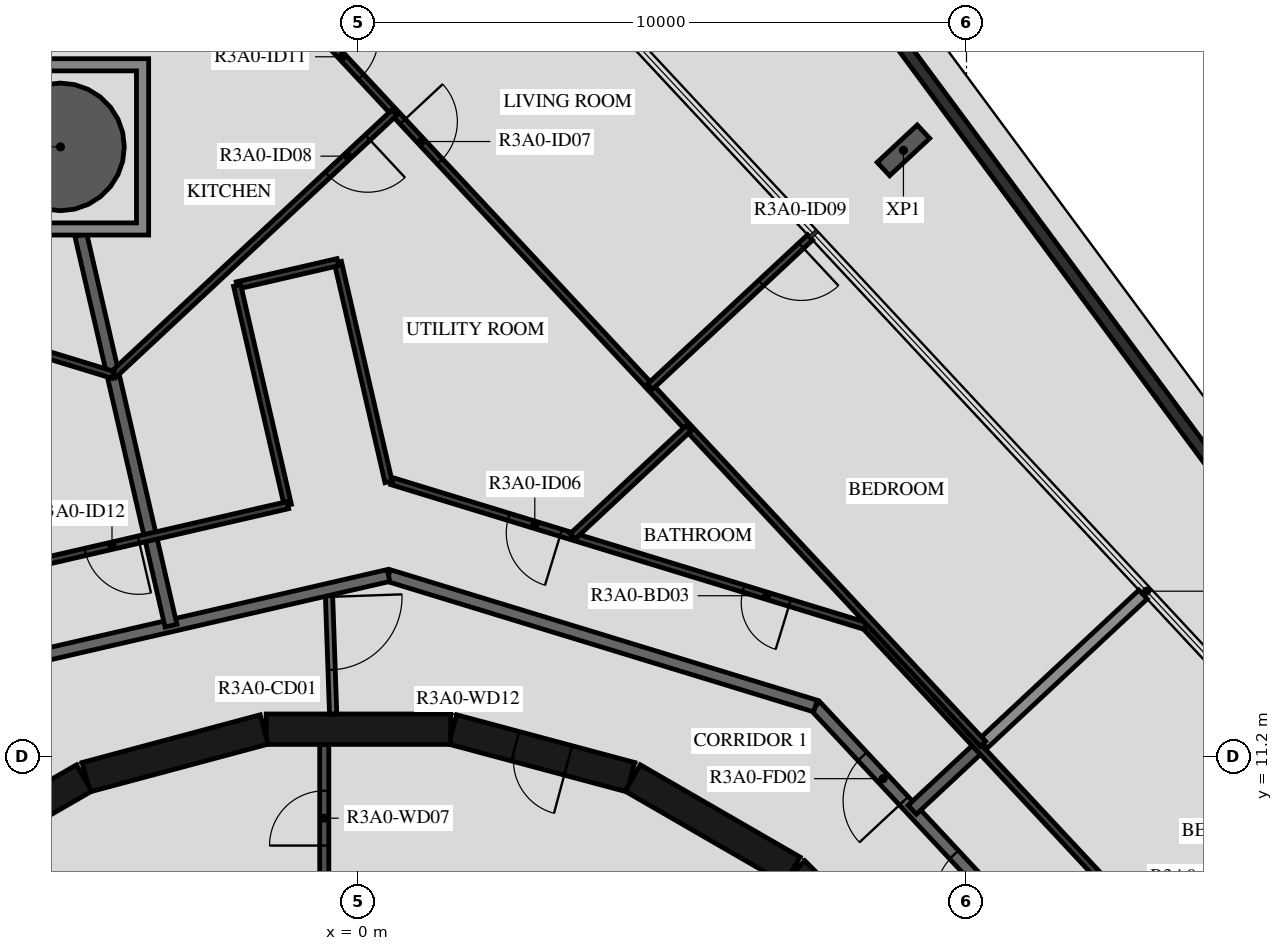
"""IFC4 building model, lengths in metres.
Left out: names, types, materials, properties, quantities, classifications, styles, units other than length and angle.
Written with IfcOpenShell. Run it as: python <this file> out.ifc"""

import sys

from ifc_helpers import new_model, si_unit, direction, frame, frame_2d, origin, origin_2d, place, context, subcontext, project, spatial, polyline, rectangle, hollow_circle, i_section, outline, extrude, element, fill, save


model = new_model("IFC4")
c1 = context("Model", 3, precision=1e-05, world=origin(), true_north=direction((0.0, 1.0)))
c2 = subcontext(c1, "Body", "Model", "MODEL_VIEW")
j1 = project(units=[si_unit("LENGTHUNIT", "METRE"), si_unit("PLANEANGLEUNIT", "RADIAN")], contexts=[c1])
p1 = place(None, origin())
s1 = spatial("IfcSite", under=j1, at=p1, CompositionType="ELEMENT")
p2 = place(p1, origin())
s2 = spatial("IfcBuilding", under=s1, at=p2, CompositionType="ELEMENT")
p3 = place(p2, frame((0.0, 0.0, 113.4)))
s3 = spatial("IfcBuildingStorey", under=s2, at=p3, CompositionType="ELEMENT", Elevation=113.4)
p4 = place(p3, frame((-4.9, 21.223, -0.45), z_axis=(0.0, 0.0, 1.0), x_axis=(1.0, 0.0, 0.0)))
e1 = element("IfcColumn", 1, at=p4, inside=s3, PredefinedType="COLUMN", context=c2, shape_type="SweptSolid", body=[
    extrude(hollow_circle(Radius=1.05, WallThickness=0.05, at=origin_2d()), origin(), (0.0, 0.0, 1.0), 3.57),
])
p5 = place(p3, frame((8.963, 21.167, -0.45), z_axis=(0.0, 0.0, 1.0), x_axis=(0.68199801865, -0.731354019992, 0.0)))
e2 = element("IfcColumn", 2, at=p5, inside=s3, PredefinedType="COLUMN", context=c2, shape_type="SweptSolid", body=[
    extrude(i_section(OverallWidth=0.3, OverallDepth=0.9, WebThickness=0.019, FlangeThickness=0.035, FilletRadius=0.03, at=origin_2d()), origin(), (0.0, 0.0, 1.0), 3.57),
])
p6 = place(p3, frame((5.146, 28.027, 0.03), z_axis=(0.0, 0.0, 1.0), x_axis=(0.595048436217, -0.803689839774, 0.0)))
e3 = element("IfcWall", 3, at=p6, inside=s3, PredefinedType="PARAPET", context=c2, shape_type="SweptSolid", body=[
    extrude(rectangle(XDim=35.306, YDim=0.2, at=frame_2d((17.653, 0.0))), origin(), (0.0, 0.0, 1.0), 1.5),
])
p7 = place(p3, frame((9.308, 7.164, 0.0), z_axis=(0.0, 0.0, 1.0), x_axis=(-0.707106781187, 0.707106781187, 0.0)))
e4 = element("IfcWall", 4, at=p7, inside=s3, PredefinedType="SHEAR", context=c2, shape_type="SweptSolid", body=[
    extrude(rectangle(XDim=3.032, YDim=0.5, at=frame_2d((1.516, 0.0))), origin(), (0.0, 0.0, 1.0), 3.12),
])
p8 = place(p7, frame((0.416, 0.0, 0.0)))
e5 = element("IfcOpeningElement", 5, at=p8, cuts=e4, PredefinedType="OPENING", context=c2, shape_type="SweptSolid", body=[
    extrude(rectangle(XDim=1.2, YDim=2.1, at=frame_2d((0.6, 1.05))), frame((0.0, 0.26, 0.0), z_axis=(0.0, -1.0, 0.0), x_axis=(1.0, 0.0, 0.0)), (0.0, 0.0, 1.0), 0.52),
])
p9 = place(p3, frame((7.137, 9.329, 0.0), z_axis=(0.0, 0.0, 1.0), x_axis=(-0.865975092491, 0.500087131594, 0.0)))
e6 = element("IfcWall", 6, at=p9, inside=s3, PredefinedType="SHEAR", context=c2, shape_type="SweptSolid", body=[
    extrude(rectangle(XDim=3.033, YDim=0.5, at=frame_2d((1.516, 0.0))), origin(), (0.0, 0.0, 1.0), 3.12),
])
p10 = place(p3, frame((4.479, 10.858, 0.0), z_axis=(0.0, 0.0, 1.0), x_axis=(-0.965948410781, 0.258734743916, 0.0)))
e7 = element("IfcWall", 7, at=p10, inside=s3, PredefinedType="SHEAR", context=c2, shape_type="SweptSolid", body=[
    extrude(rectangle(XDim=3.033, YDim=0.5, at=frame_2d((1.516, 0.0))), origin(), (0.0, 0.0, 1.0), 3.12),
])
p11 = place(p10, frame((1.066, 0.0, 0.0)))
e8 = element("IfcOpeningElement", 8, at=p11, cuts=e7, PredefinedType="OPENING", context=c2, shape_type="SweptSolid", body=[
    extrude(rectangle(XDim=0.9, YDim=2.1, at=frame_2d((0.45, 1.05))), frame((0.0, 0.26, 0.0), z_axis=(0.0, -1.0, 0.0), x_axis=(1.0, 0.0, 0.0)), (0.0, 0.0, 1.0), 0.52),
])
for number, where, z_axis, x_axis in (
    (9, (1.516, 11.647, 0.0), (0.0, 0.0, 1.0), (-1.0, 0.0, 0.0)),
    (10, (-1.55, 11.643, 0.0), (0.0, 0.0, 1.0), (-0.966, -0.259, 0.0)),
    (11, (-4.51, 10.845, 0.0), (0.0, 0.0, 1.0), (-0.866, -0.5, 0.0)),
):
    element("IfcWall", number, at=place(p3, frame(where, z_axis=z_axis, x_axis=x_axis)), inside=s3, PredefinedType="SHEAR", context=c2, shape_type="SweptSolid", body=[
        extrude(rectangle(XDim=3.033, YDim=0.5, at=frame_2d((1.516, 0.0))), origin(), (0.0, 0.0, 1.0), 3.12),
    ])
p12 = place(p3, frame((-0.562, 8.97, 0.0), z_axis=(0.0, 0.0, 1.0), x_axis=(0.0, 1.0, 0.0)))
e12 = element("IfcWall", 12, at=p12, inside=s3, PredefinedType="PARTITIONING", context=c2, shape_type="SweptSolid", body=[
    extrude(rectangle(XDim=2.427, YDim=0.15, at=frame_2d((1.214, 0.0))), origin(), (0.0, 0.0, 1.0), 3.12),
])
p13 = place(p12, frame((0.764, 0.0, 0.0)))
e13 = element("IfcOpeningElement", 13, at=p13, cuts=e12, PredefinedType="OPENING", context=c2, shape_type="SweptSolid", body=[
    extrude(rectangle(XDim=0.9, YDim=2.1, at=frame_2d((0.45, 1.05))), frame((0.0, 0.085, 0.0), z_axis=(0.0, -1.0, 0.0), x_axis=(1.0, 0.0, 0.0)), (0.0, 0.0, 1.0), 0.17),
])
p14 = place(p3, frame((-0.487, 13.948, 0.0), z_axis=(0.0, 0.0, 1.0), x_axis=(0.034859752231, -0.999392214135, 0.0)))
e14 = element("IfcWall", 14, at=p14, inside=s3, PredefinedType="PARTITIONING", context=c2, shape_type="SweptSolid", body=[
    extrude(rectangle(XDim=2.052, YDim=0.12, at=frame_2d((1.026, 0.0))), origin(), (0.0, 0.0, 1.0), 3.12),
])
p15 = place(p14, frame((0.125, 0.0, 0.0)))
e15 = element("IfcOpeningElement", 15, at=p15, cuts=e14, PredefinedType="OPENING", context=c2, shape_type="SweptSolid", body=[
    extrude(rectangle(XDim=1.2, YDim=2.1, at=frame_2d((0.6, 1.05))), frame((0.0, 0.07, 0.0), z_axis=(0.0, -1.0, 0.0), x_axis=(1.0, 0.0, 0.0)), (0.0, 0.0, 1.0), 0.14),
])
p16 = place(p3, frame((12.523, 6.659, 0.0), z_axis=(0.0, 0.0, 1.0), x_axis=(-0.682001841105, 0.731350455479, 0.0)))
e16 = element("IfcWall", 16, at=p16, inside=s3, PredefinedType="STANDARD", context=c2, shape_type="SweptSolid", body=[
    extrude(rectangle(XDim=7.342, YDim=0.2, at=frame_2d((3.671, 0.0))), origin(), (0.0, 0.0, 1.0), 3.12),
])
p17 = place(p16, frame((3.0, 0.0, 0.0)))
e17 = element("IfcOpeningElement", 17, at=p17, cuts=e16, PredefinedType="OPENING", context=c2, shape_type="SweptSolid", body=[
    extrude(rectangle(XDim=1.0, YDim=2.1, at=frame_2d((0.5, 1.05))), frame((0.0, 0.11, 0.0), z_axis=(0.0, -1.0, 0.0), x_axis=(1.0, 0.0, 0.0)), (0.0, 0.0, 1.0), 0.22),
])
p18 = place(p16, frame((5.209, 0.0, 0.0)))
e18 = element("IfcOpeningElement", 18, at=p18, cuts=e16, PredefinedType="OPENING", context=c2, shape_type="SweptSolid", body=[
    extrude(rectangle(XDim=1.0, YDim=2.1, at=frame_2d((0.5, 1.05))), frame((0.0, 0.11, 0.0), z_axis=(0.0, -1.0, 0.0), x_axis=(1.0, 0.0, 0.0)), (0.0, 0.0, 1.0), 0.22),
])
p19 = place(p3, frame((7.516, 12.028, 0.0), z_axis=(0.0, 0.0, 1.0), x_axis=(-0.956306642771, 0.292365533182, 0.0)))
e19 = element("IfcWall", 19, at=p19, inside=s3, PredefinedType="STANDARD", context=c2, shape_type="SweptSolid", body=[
    extrude(rectangle(XDim=7.342, YDim=0.2, at=frame_2d((3.671, 0.0))), origin(), (0.0, 0.0, 1.0), 3.12),
])
p20 = place(p3, frame((0.495, 14.175, 0.0), z_axis=(0.0, 0.0, 1.0), x_axis=(-0.974376622151, -0.224922649383, 0.0)))
e20 = element("IfcWall", 20, at=p20, inside=s3, PredefinedType="STANDARD", context=c2, shape_type="SweptSolid", body=[
    extrude(rectangle(XDim=7.342, YDim=0.2, at=frame_2d((3.671, 0.0))), origin(), (0.0, 0.0, 1.0), 3.12),
])
p21 = place(p3, frame((10.233, 11.372, 0.0), z_axis=(0.0, 0.0, 1.0), x_axis=(-0.731329353292, -0.682024469513, 0.0)))
e21 = element("IfcWall", 21, at=p21, inside=s3, PredefinedType="STANDARD", context=c2, shape_type="SweptSolid", body=[
    extrude(rectangle(XDim=1.54, YDim=0.2, at=frame_2d((0.77, 0.0))), origin(), (0.0, 0.0, 1.0), 3.12),
])
p22 = place(p3, frame((12.903, 13.862, 0.0), z_axis=(0.0, 0.0, 1.0), x_axis=(-0.731328084739, -0.682025829769, 0.0)))
e22 = element("IfcWall", 22, at=p22, inside=s3, PredefinedType="STANDARD", context=c2, shape_type="SweptSolid", body=[
    extrude(rectangle(XDim=3.6, YDim=0.2, at=frame_2d((1.8, 0.0))), origin(), (0.0, 0.0, 1.0), 2.73),
])
p23 = place(p3, frame((-4.565, 19.773, 0.0), z_axis=(0.0, 0.0, 1.0), x_axis=(0.224940633072, -0.974372470667, 0.0)))
e23 = element("IfcWall", 23, at=p23, inside=s3, PredefinedType="STANDARD", context=c2, shape_type="SweptSolid", body=[
    extrude(rectangle(XDim=6.594, YDim=0.2, at=frame_2d((3.297, 0.0))), origin(), (0.0, 0.0, 1.0), 3.12),
])
p24 = place(p3, frame((13.894, 7.388, 0.0), z_axis=(0.0, 0.0, 1.0), x_axis=(-0.681994622729, 0.731357186721, 0.0)))
e24 = element("IfcWall", 24, at=p24, inside=s3, PredefinedType="PARTITIONING", context=c2, shape_type="SweptSolid", body=[
    extrude(rectangle(XDim=8.146, YDim=0.12, at=frame_2d((4.073, 0.0))), origin(), (0.0, 0.0, 1.0), 3.12),
])
p25 = place(p24, frame((0.2, 0.0, 0.0)))
e25 = element("IfcOpeningElement", 25, at=p25, cuts=e24, PredefinedType="OPENING", context=c2, shape_type="SweptSolid", body=[
    extrude(rectangle(XDim=0.9, YDim=2.1, at=frame_2d((0.45, 1.05))), frame((0.0, 0.07, 0.0), z_axis=(0.0, -1.0, 0.0), x_axis=(1.0, 0.0, 0.0)), (0.0, 0.0, 1.0), 0.14),
])
p26 = place(p3, frame((8.339, 13.345, 0.0), z_axis=(0.0, 0.0, 1.0), x_axis=(-0.956310145342, 0.292354076276, 0.0)))
e26 = element("IfcWall", 26, at=p26, inside=s3, PredefinedType="PARTITIONING", context=c2, shape_type="SweptSolid", body=[
    extrude(rectangle(XDim=8.146, YDim=0.12, at=frame_2d((4.073, 0.0))), origin(), (0.0, 0.0, 1.0), 3.12),
])
p27 = place(p26, frame((1.3, 0.0, 0.0)))
e27 = element("IfcOpeningElement", 27, at=p27, cuts=e26, PredefinedType="OPENING", context=c2, shape_type="SweptSolid", body=[
    extrude(rectangle(XDim=0.8, YDim=2.1, at=frame_2d((0.4, 1.05))), frame((0.0, 0.07, 0.0), z_axis=(0.0, -1.0, 0.0), x_axis=(1.0, 0.0, 0.0)), (0.0, 0.0, 1.0), 0.14),
])
p28 = place(p26, frame((5.237, 0.0, 0.0)))
e28 = element("IfcOpeningElement", 28, at=p28, cuts=e26, PredefinedType="OPENING", context=c2, shape_type="SweptSolid", body=[
    extrude(rectangle(XDim=0.9, YDim=2.1, at=frame_2d((0.45, 1.05))), frame((0.0, 0.07, 0.0), z_axis=(0.0, -1.0, 0.0), x_axis=(1.0, 0.0, 0.0)), (0.0, 0.0, 1.0), 0.14),
])
p29 = place(p3, frame((0.496, 15.714, 0.0), z_axis=(0.0, 0.0, 1.0), x_axis=(-0.224960478174, 0.974367889075, 0.0)))
e29 = element("IfcWall", 29, at=p29, inside=s3, PredefinedType="PARTITIONING", context=c2, shape_type="SweptSolid", body=[
    extrude(rectangle(XDim=3.708, YDim=0.12, at=frame_2d((1.854, 0.0))), origin(), (0.0, 0.0, 1.0), 3.12),
])
p30 = place(p3, frame((-0.338, 19.328, 0.0), z_axis=(0.0, 0.0, 1.0), x_axis=(-0.974383934081, -0.224890971374, 0.0)))
e30 = element("IfcWall", 30, at=p30, inside=s3, PredefinedType="PARTITIONING", context=c2, shape_type="SweptSolid", body=[
    extrude(rectangle(XDim=1.7, YDim=0.12, at=frame_2d((0.85, 0.0))), origin(), (0.0, 0.0, 1.0), 3.12),
])
p31 = place(p3, frame((-1.995, 18.945, 0.0), z_axis=(0.0, 0.0, 1.0), x_axis=(0.224946048274, -0.974371220514, 0.0)))
e31 = element("IfcWall", 31, at=p31, inside=s3, PredefinedType="PARTITIONING", context=c2, shape_type="SweptSolid", body=[
    extrude(rectangle(XDim=3.708, YDim=0.12, at=frame_2d((1.854, 0.0))), origin(), (0.0, 0.0, 1.0), 3.12),
])
p32 = place(p3, frame((-1.161, 15.332, 0.0), z_axis=(0.0, 0.0, 1.0), x_axis=(-0.974373440078, -0.224936433845, 0.0)))
e32 = element("IfcWall", 32, at=p32, inside=s3, PredefinedType="PARTITIONING", context=c2, shape_type="SweptSolid", body=[
    extrude(rectangle(XDim=4.636, YDim=0.12, at=frame_2d((2.318, 0.0))), origin(), (0.0, 0.0, 1.0), 3.12),
])
p33 = place(p32, frame((2.518, 0.0, 0.0)))
e33 = element("IfcOpeningElement", 33, at=p33, cuts=e32, PredefinedType="OPENING", context=c2, shape_type="SweptSolid", body=[
    extrude(rectangle(XDim=0.9, YDim=2.1, at=frame_2d((0.45, 1.05))), frame((0.0, 0.07, 0.0), z_axis=(0.0, -1.0, 0.0), x_axis=(1.0, 0.0, 0.0)), (0.0, 0.0, 1.0), 0.14),
])
p34 = place(p3, frame((-1.539, 24.071, 0.0), z_axis=(0.0, 0.0, 1.0), x_axis=(0.68200220595, -0.731350115252, 0.0)))
e34 = element("IfcWall", 34, at=p34, inside=s3, PredefinedType="PARTITIONING", context=c2, shape_type="SweptSolid", body=[
    extrude(rectangle(XDim=17.316, YDim=0.12, at=frame_2d((8.658, 0.0))), origin(), (0.0, 0.0, 1.0), 3.12),
])
p35 = place(p34, frame((3.323, 0.0, 0.0)))
e35 = element("IfcOpeningElement", 35, at=p35, cuts=e34, PredefinedType="OPENING", context=c2, shape_type="SweptSolid", body=[
    extrude(rectangle(XDim=0.9, YDim=2.1, at=frame_2d((0.45, 1.05))), frame((0.0, 0.07, 0.0), z_axis=(0.0, -1.0, 0.0), x_axis=(1.0, 0.0, 0.0)), (0.0, 0.0, 1.0), 0.14),
])
p36 = place(p34, frame((1.417, 0.0, 0.0)))
e36 = element("IfcOpeningElement", 36, at=p36, cuts=e34, PredefinedType="OPENING", context=c2, shape_type="SweptSolid", body=[
    extrude(rectangle(XDim=0.9, YDim=2.1, at=frame_2d((0.45, 1.05))), frame((0.0, 0.07, 0.0), z_axis=(0.0, -1.0, 0.0), x_axis=(1.0, 0.0, 0.0)), (0.0, 0.0, 1.0), 0.14),
])
p37 = place(p3, frame((7.427, 19.734, 0.0), z_axis=(0.0, 0.0, 1.0), x_axis=(-0.73139345201, -0.681955730497, 0.0)))
e37 = element("IfcWall", 37, at=p37, inside=s3, PredefinedType="PARTITIONING", context=c2, shape_type="SweptSolid", body=[
    extrude(rectangle(XDim=3.6, YDim=0.12, at=frame_2d((1.8, 0.0))), origin(), (0.0, 0.0, 1.0), 2.73),
])
p38 = place(p37, frame((0.2, 0.0, 0.0)))
e38 = element("IfcOpeningElement", 38, at=p38, cuts=e37, PredefinedType="OPENING", context=c2, shape_type="SweptSolid", body=[
    extrude(rectangle(XDim=0.9, YDim=2.1, at=frame_2d((0.45, 1.05))), frame((0.0, 0.07, 0.0), z_axis=(0.0, -1.0, 0.0), x_axis=(1.0, 0.0, 0.0)), (0.0, 0.0, 1.0), 0.14),
])
p39 = place(p3, frame((5.431, 16.597, 0.0), z_axis=(0.0, 0.0, 1.0), x_axis=(-0.731378807316, -0.681971436505, 0.0)))
e39 = element("IfcWall", 39, at=p39, inside=s3, PredefinedType="PARTITIONING", context=c2, shape_type="SweptSolid", body=[
    extrude(rectangle(XDim=2.609, YDim=0.12, at=frame_2d((1.305, 0.0))), origin(), (0.0, 0.0, 1.0), 3.12),
])
p40 = place(p3, frame((0.591, 21.787, 0.0), z_axis=(0.0, 0.0, 1.0), x_axis=(-0.731363296574, -0.681988070588, 0.0)))
e40 = element("IfcWall", 40, at=p40, inside=s3, PredefinedType="PARTITIONING", context=c2, shape_type="SweptSolid", body=[
    extrude(rectangle(XDim=6.324, YDim=0.12, at=frame_2d((3.162, 0.0))), origin(), (0.0, 0.0, 1.0), 3.12),
])
p41 = place(p40, frame((0.6, 0.0, 0.0)))
e41 = element("IfcOpeningElement", 41, at=p41, cuts=e40, PredefinedType="OPENING", context=c2, shape_type="SweptSolid", body=[
    extrude(rectangle(XDim=0.9, YDim=2.1, at=frame_2d((0.45, 1.05))), frame((0.0, 0.07, 0.0), z_axis=(0.0, -1.0, 0.0), x_axis=(1.0, 0.0, 0.0)), (0.0, 0.0, 1.0), 0.14),
])
p42 = place(p3, frame((-10.082, 19.323, 0.0), z_axis=(0.0, 0.0, 1.0), x_axis=(0.956300011431, -0.292387222936, 0.0)))
e42 = element("IfcWall", 42, at=p42, inside=s3, PredefinedType="PARTITIONING", context=c2, shape_type="SweptSolid", body=[
    extrude(rectangle(XDim=6.324, YDim=0.12, at=frame_2d((3.162, 0.0))), origin(), (0.0, 0.0, 1.0), 3.12),
])
p43 = place(p42, frame((0.2, 0.0, 0.0)))
e43 = element("IfcOpeningElement", 43, at=p43, cuts=e42, PredefinedType="OPENING", context=c2, shape_type="SweptSolid", body=[
    extrude(rectangle(XDim=0.9, YDim=2.1, at=frame_2d((0.45, 1.05))), frame((0.0, 0.07, 0.0), z_axis=(0.0, -1.0, 0.0), x_axis=(1.0, 0.0, 0.0)), (0.0, 0.0, 1.0), 0.14),
])
p44 = place(p3, origin())
e44 = element("IfcWall", 44, at=p44, inside=s3, PredefinedType="STANDARD", context=c2, shape_type="SweptSolid", body=[
    extrude(outline(polyline([(-3.45, 22.674), (-3.45, 19.773), (-6.35, 19.773), (-6.35, 22.674), (-3.45, 22.674)]), holes=[polyline([(-6.15, 19.973), (-3.65, 19.973), (-3.65, 22.473), (-6.15, 22.473), (-6.15, 19.973)])]), origin(), (0.0, 0.0, 1.0), 3.12),
])
p45 = place(p13, origin())
e45 = element("IfcDoor", 45, at=p45, inside=s3, OperationType="SINGLE_SWING_RIGHT", PredefinedType="DOOR", context=c2, shape_type="SweptSolid", body=[
    extrude(rectangle(XDim=0.9, YDim=2.1, at=frame_2d((0.45, 1.05))), frame((0.0, 0.025, 0.0), z_axis=(0.0, -1.0, 0.0), x_axis=(1.0, 0.0, 0.0)), (0.0, 0.0, 1.0), 0.05),
])
fill(e13, e45)
p46 = place(p11, origin())
e46 = element("IfcDoor", 46, at=p46, inside=s3, OperationType="SINGLE_SWING_LEFT", PredefinedType="DOOR", context=c2, shape_type="SweptSolid", body=[
    extrude(rectangle(XDim=0.9, YDim=2.1, at=frame_2d((0.45, 1.05))), frame((0.0, 0.025, 0.0), z_axis=(0.0, -1.0, 0.0), x_axis=(1.0, 0.0, 0.0)), (0.0, 0.0, 1.0), 0.05),
])
fill(e8, e46)
p47 = place(p17, origin())
e47 = element("IfcDoor", 47, at=p47, inside=s3, OperationType="SINGLE_SWING_LEFT", PredefinedType="DOOR", context=c2, shape_type="SweptSolid", body=[
    extrude(rectangle(XDim=1.0, YDim=2.1, at=frame_2d((0.5, 1.05))), frame((0.0, 0.025, 0.0), z_axis=(0.0, -1.0, 0.0), x_axis=(1.0, 0.0, 0.0)), (0.0, 0.0, 1.0), 0.05),
])
fill(e17, e47)
p48 = place(p18, origin())
e48 = element("IfcDoor", 48, at=p48, inside=s3, OperationType="SINGLE_SWING_RIGHT", PredefinedType="DOOR", context=c2, shape_type="SweptSolid", body=[
    extrude(rectangle(XDim=1.0, YDim=2.1, at=frame_2d((0.5, 1.05))), frame((0.0, 0.025, 0.0), z_axis=(0.0, -1.0, 0.0), x_axis=(1.0, 0.0, 0.0)), (0.0, 0.0, 1.0), 0.05),
])
fill(e18, e48)
p49 = place(p27, origin())
e49 = element("IfcDoor", 49, at=p49, inside=s3, OperationType="SINGLE_SWING_RIGHT", PredefinedType="DOOR", context=c2, shape_type="SweptSolid", body=[
    extrude(rectangle(XDim=0.8, YDim=2.1, at=frame_2d((0.4, 1.05))), frame((0.0, 0.025, 0.0), z_axis=(0.0, -1.0, 0.0), x_axis=(1.0, 0.0, 0.0)), (0.0, 0.0, 1.0), 0.05),
])
fill(e27, e49)
p50 = place(p28, origin())
e50 = element("IfcDoor", 50, at=p50, inside=s3, OperationType="SINGLE_SWING_RIGHT", PredefinedType="DOOR", context=c2, shape_type="SweptSolid", body=[
    extrude(rectangle(XDim=0.9, YDim=2.1, at=frame_2d((0.45, 1.05))), frame((0.0, 0.025, 0.0), z_axis=(0.0, -1.0, 0.0), x_axis=(1.0, 0.0, 0.0)), (0.0, 0.0, 1.0), 0.05),
])
fill(e28, e50)
p51 = place(p35, origin())
e51 = element("IfcDoor", 51, at=p51, inside=s3, OperationType="SINGLE_SWING_RIGHT", PredefinedType="DOOR", context=c2, shape_type="SweptSolid", body=[
    extrude(rectangle(XDim=0.9, YDim=2.1, at=frame_2d((0.45, 1.05))), frame((0.0, 0.025, 0.0), z_axis=(0.0, -1.0, 0.0), x_axis=(1.0, 0.0, 0.0)), (0.0, 0.0, 1.0), 0.05),
])
fill(e35, e51)
p52 = place(p41, origin())
e52 = element("IfcDoor", 52, at=p52, inside=s3, OperationType="SINGLE_SWING_RIGHT", PredefinedType="DOOR", context=c2, shape_type="SweptSolid", body=[
    extrude(rectangle(XDim=0.9, YDim=2.1, at=frame_2d((0.45, 1.05))), frame((0.0, 0.025, 0.0), z_axis=(0.0, -1.0, 0.0), x_axis=(1.0, 0.0, 0.0)), (0.0, 0.0, 1.0), 0.05),
])
fill(e41, e52)
p53 = place(p38, origin())
e53 = element("IfcDoor", 53, at=p53, inside=s3, OperationType="SINGLE_SWING_LEFT", PredefinedType="DOOR", context=c2, shape_type="SweptSolid", body=[
    extrude(rectangle(XDim=0.9, YDim=2.1, at=frame_2d((0.45, 1.05))), frame((0.0, 0.025, 0.0), z_axis=(0.0, -1.0, 0.0), x_axis=(1.0, 0.0, 0.0)), (0.0, 0.0, 1.0), 0.05),
])
fill(e38, e53)
p54 = place(p36, origin())
e54 = element("IfcDoor", 54, at=p54, inside=s3, OperationType="SINGLE_SWING_LEFT", PredefinedType="DOOR", context=c2, shape_type="SweptSolid", body=[
    extrude(rectangle(XDim=0.9, YDim=2.1, at=frame_2d((0.45, 1.05))), frame((0.0, 0.025, 0.0), z_axis=(0.0, -1.0, 0.0), x_axis=(1.0, 0.0, 0.0)), (0.0, 0.0, 1.0), 0.05),
])
fill(e36, e54)
p55 = place(p33, origin())
e55 = element("IfcDoor", 55, at=p55, inside=s3, OperationType="SINGLE_SWING_LEFT", PredefinedType="DOOR", context=c2, shape_type="SweptSolid", body=[
    extrude(rectangle(XDim=0.9, YDim=2.1, at=frame_2d((0.45, 1.05))), frame((0.0, 0.025, 0.0), z_axis=(0.0, -1.0, 0.0), x_axis=(1.0, 0.0, 0.0)), (0.0, 0.0, 1.0), 0.05),
])
fill(e33, e55)
p56 = place(p15, origin())
e56 = element("IfcDoor", 56, at=p56, inside=s3, OperationType="DOUBLE_DOOR_SINGLE_SWING", PredefinedType="DOOR", context=c2, shape_type="SweptSolid", body=[
    extrude(rectangle(XDim=1.2, YDim=2.1, at=frame_2d((0.6, 1.05))), frame((0.0, 0.025, 0.0), z_axis=(0.0, -1.0, 0.0), x_axis=(1.0, 0.0, 0.0)), (0.0, 0.0, 1.0), 0.05),
])
fill(e15, e56)
save(model, sys.argv[1])
